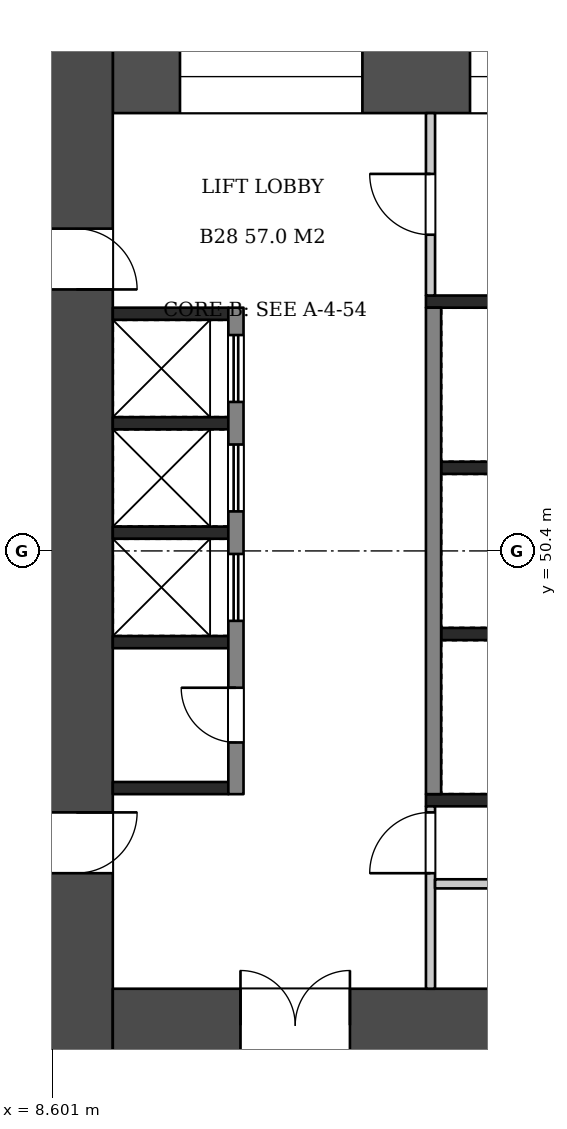
"""IFC4 building model, lengths in metres.
Left out: names, types, materials, properties, quantities, classifications, styles, units other than length and angle.
Written with IfcOpenShell. Run it as: python <this file> out.ifc"""

import sys

from ifc_helpers import new_model, si_unit, direction, frame, frame_2d, origin, place, context, subcontext, project, spatial, rectangle, extrude, element, fill, save


model = new_model("IFC4")
c1 = context("Model", 3, precision=1e-05, world=origin(), true_north=direction((0.0, 1.0)))
c2 = subcontext(c1, "Body", "Model", "MODEL_VIEW")
j1 = project(units=[si_unit("LENGTHUNIT", "METRE"), si_unit("PLANEANGLEUNIT", "RADIAN")], contexts=[c1])
p1 = place(None, origin())
s1 = spatial("IfcSite", under=j1, at=p1, CompositionType="ELEMENT")
p2 = place(p1, origin())
s2 = spatial("IfcBuilding", under=s1, at=p2, CompositionType="ELEMENT")
p3 = place(p2, frame((0.0, 0.0, 112.7)))
s3 = spatial("IfcBuildingStorey", under=s2, at=p3, CompositionType="ELEMENT", Elevation=112.7)
p4 = place(p3, frame((9.0, 58.8, 0.0), z_axis=(0.0, 0.0, 1.0), x_axis=(0.0, -1.0, 0.0)))
e1 = element("IfcWall", 1, at=p4, inside=s3, PredefinedType="SHEAR", context=c2, shape_type="SweptSolid", body=[
    extrude(rectangle(XDim=16.8, YDim=1.2, at=frame_2d((8.4, 0.0))), origin(), (0.0, 0.0, 1.0), 3.22),
])
p5 = place(p4, frame((3.1, 0.0, 0.0)))
e2 = element("IfcOpeningElement", 2, at=p5, cuts=e1, PredefinedType="OPENING", context=c2, shape_type="SweptSolid", body=[
    extrude(rectangle(XDim=1.0, YDim=2.1, at=frame_2d((0.5, 1.05))), frame((0.0, 0.61, 0.0), z_axis=(0.0, -1.0, 0.0), x_axis=(1.0, 0.0, 0.0)), (0.0, 0.0, 1.0), 1.22),
])
p6 = place(p4, frame((12.7, 0.0, 0.0)))
e3 = element("IfcOpeningElement", 3, at=p6, cuts=e1, PredefinedType="OPENING", context=c2, shape_type="SweptSolid", body=[
    extrude(rectangle(XDim=1.0, YDim=2.1, at=frame_2d((0.5, 1.05))), frame((0.0, 0.61, 0.0), z_axis=(0.0, -1.0, 0.0), x_axis=(1.0, 0.0, 0.0)), (0.0, 0.0, 1.0), 1.22),
])
p7 = place(p3, frame((9.6, 58.2, 0.0), z_axis=(0.0, 0.0, 1.0), x_axis=(1.0, 0.0, 0.0)))
e4 = element("IfcWall", 4, at=p7, inside=s3, PredefinedType="SHEAR", context=c2, shape_type="SweptSolid", body=[
    extrude(rectangle(XDim=14.4, YDim=1.2, at=frame_2d((7.2, 0.0))), origin(), (0.0, 0.0, 1.0), 3.22),
])
p8 = place(p7, frame((1.105, 0.0, 0.6)))
e5 = element("IfcOpeningElement", 5, at=p8, cuts=e4, PredefinedType="OPENING", context=c2, shape_type="SweptSolid", body=[
    extrude(rectangle(XDim=3.0, YDim=2.1, at=frame_2d((1.5, 1.05))), frame((0.0, 0.61, 0.0), z_axis=(0.0, -1.0, 0.0), x_axis=(1.0, 0.0, 0.0)), (0.0, 0.0, 1.0), 1.22),
])
p9 = place(p7, frame((5.875, 0.0, 0.6)))
e6 = element("IfcOpeningElement", 6, at=p9, cuts=e4, PredefinedType="OPENING", context=c2, shape_type="SweptSolid", body=[
    extrude(rectangle(XDim=2.4, YDim=2.1, at=frame_2d((1.2, 1.05))), frame((0.0, 0.61, 0.0), z_axis=(0.0, -1.0, 0.0), x_axis=(1.0, 0.0, 0.0)), (0.0, 0.0, 1.0), 1.22),
])
p10 = place(p7, frame((9.993, 0.0, 0.5)))
e7 = element("IfcOpeningElement", 7, at=p10, cuts=e4, PredefinedType="OPENING", context=c2, shape_type="SweptSolid", body=[
    extrude(rectangle(XDim=1.2, YDim=2.4, at=frame_2d((0.6, 1.2))), frame((0.0, 0.61, 0.0), z_axis=(0.0, -1.0, 0.0), x_axis=(1.0, 0.0, 0.0)), (0.0, 0.0, 1.0), 1.22),
])
p11 = place(p7, frame((12.197, 0.0, 0.5)))
e8 = element("IfcOpeningElement", 8, at=p11, cuts=e4, PredefinedType="OPENING", context=c2, shape_type="SweptSolid", body=[
    extrude(rectangle(XDim=1.2, YDim=2.4, at=frame_2d((0.6, 1.2))), frame((0.0, 0.61, 0.0), z_axis=(0.0, -1.0, 0.0), x_axis=(1.0, 0.0, 0.0)), (0.0, 0.0, 1.0), 1.22),
])
p12 = place(p3, frame((9.6, 42.6, 0.0), z_axis=(0.0, 0.0, 1.0), x_axis=(1.0, 0.0, 0.0)))
e9 = element("IfcWall", 9, at=p12, inside=s3, PredefinedType="SHEAR", context=c2, shape_type="SweptSolid", body=[
    extrude(rectangle(XDim=14.4, YDim=1.2, at=frame_2d((7.2, 0.0))), origin(), (0.0, 0.0, 1.0), 3.22),
])
p13 = place(p12, frame((2.1, 0.0, 0.0)))
e10 = element("IfcOpeningElement", 10, at=p13, cuts=e9, PredefinedType="OPENING", context=c2, shape_type="SweptSolid", body=[
    extrude(rectangle(XDim=1.8, YDim=2.1, at=frame_2d((0.9, 1.05))), frame((0.0, 0.61, 0.0), z_axis=(0.0, -1.0, 0.0), x_axis=(1.0, 0.0, 0.0)), (0.0, 0.0, 1.0), 1.22),
])
for number, where, z_axis, x_axis in (
    (11, (9.6, 54.3, 0.0), (0.0, 0.0, 1.0), (1.0, 0.0, 0.0)),
    (12, (9.6, 52.5, 0.0), (0.0, 0.0, 1.0), (1.0, 0.0, 0.0)),
    (13, (9.6, 50.7, 0.0), (0.0, 0.0, 1.0), (1.0, 0.0, 0.0)),
    (14, (9.6, 48.9, 0.0), (0.0, 0.0, 1.0), (1.0, 0.0, 0.0)),
    (15, (9.6, 46.5, 0.0), (0.0, 0.0, 1.0), (1.0, 0.0, 0.0)),
):
    element("IfcWall", number, at=place(p3, frame(where, z_axis=z_axis, x_axis=x_axis)), inside=s3, PredefinedType="SHEAR", context=c2, shape_type="SweptSolid", body=[
        extrude(rectangle(XDim=1.9, YDim=0.2, at=frame_2d((0.95, 0.0))), origin(), (0.0, 0.0, 1.0), 3.22),
    ])
p14 = place(p3, frame((11.625, 54.4, 0.0), z_axis=(0.0, 0.0, 1.0), x_axis=(0.0, -1.0, 0.0)))
e16 = element("IfcWall", 16, at=p14, inside=s3, PredefinedType="SHEAR", context=c2, shape_type="SweptSolid", body=[
    extrude(rectangle(XDim=8.0, YDim=0.25, at=frame_2d((4.0, 0.0))), origin(), (0.0, 0.0, 1.0), 3.22),
])
p15 = place(p14, frame((0.45, 0.0, 0.0)))
e17 = element("IfcOpeningElement", 17, at=p15, cuts=e16, PredefinedType="OPENING", context=c2, shape_type="SweptSolid", body=[
    extrude(rectangle(XDim=1.1, YDim=2.1, at=frame_2d((0.55, 1.05))), frame((0.0, 0.135, 0.0), z_axis=(0.0, -1.0, 0.0), x_axis=(1.0, 0.0, 0.0)), (0.0, 0.0, 1.0), 0.27),
])
p16 = place(p14, frame((2.25, 0.0, 0.0)))
e18 = element("IfcOpeningElement", 18, at=p16, cuts=e16, PredefinedType="OPENING", context=c2, shape_type="SweptSolid", body=[
    extrude(rectangle(XDim=1.1, YDim=2.1, at=frame_2d((0.55, 1.05))), frame((0.0, 0.135, 0.0), z_axis=(0.0, -1.0, 0.0), x_axis=(1.0, 0.0, 0.0)), (0.0, 0.0, 1.0), 0.27),
])
p17 = place(p14, frame((4.05, 0.0, 0.0)))
e19 = element("IfcOpeningElement", 19, at=p17, cuts=e16, PredefinedType="OPENING", context=c2, shape_type="SweptSolid", body=[
    extrude(rectangle(XDim=1.1, YDim=2.1, at=frame_2d((0.55, 1.05))), frame((0.0, 0.135, 0.0), z_axis=(0.0, -1.0, 0.0), x_axis=(1.0, 0.0, 0.0)), (0.0, 0.0, 1.0), 0.27),
])
p18 = place(p14, frame((6.25, 0.0, 0.0)))
e20 = element("IfcOpeningElement", 20, at=p18, cuts=e16, PredefinedType="OPENING", context=c2, shape_type="SweptSolid", body=[
    extrude(rectangle(XDim=0.9, YDim=2.1, at=frame_2d((0.45, 1.05))), frame((0.0, 0.135, 0.0), z_axis=(0.0, -1.0, 0.0), x_axis=(1.0, 0.0, 0.0)), (0.0, 0.0, 1.0), 0.27),
])
for number, where, z_axis, x_axis in (
    (21, (15.0, 51.767, 0.0), (0.0, 0.0, 1.0), (1.0, 0.0, 0.0)),
    (22, (15.0, 49.033, 0.0), (0.0, 0.0, 1.0), (1.0, 0.0, 0.0)),
):
    element("IfcWall", number, at=place(p3, frame(where, z_axis=z_axis, x_axis=x_axis)), inside=s3, PredefinedType="SHEAR", context=c2, shape_type="SweptSolid", body=[
        extrude(rectangle(XDim=1.9, YDim=0.2, at=frame_2d((0.95, 0.0))), origin(), (0.0, 0.0, 1.0), 3.22),
    ])
p19 = place(p3, frame((14.875, 54.4, 0.0), z_axis=(0.0, 0.0, 1.0), x_axis=(0.0, -1.0, 0.0)))
e23 = element("IfcWall", 23, at=p19, inside=s3, PredefinedType="SHEAR", context=c2, shape_type="SweptSolid", body=[
    extrude(rectangle(XDim=8.0, YDim=0.25, at=frame_2d((4.0, 0.0))), origin(), (0.0, 0.0, 1.0), 3.22),
])
p20 = place(p3, frame((14.75, 54.5, 0.0), z_axis=(0.0, 0.0, 1.0), x_axis=(1.0, 0.0, 0.0)))
e24 = element("IfcWall", 24, at=p20, inside=s3, PredefinedType="SHEAR", context=c2, shape_type="SweptSolid", body=[
    extrude(rectangle(XDim=2.4, YDim=0.2, at=frame_2d((1.2, 0.0))), origin(), (0.0, 0.0, 1.0), 3.22),
])
p21 = place(p3, frame((14.825, 57.6, 0.0), z_axis=(0.0, 0.0, 1.0), x_axis=(0.0, -1.0, 0.0)))
e25 = element("IfcWall", 25, at=p21, inside=s3, PredefinedType="PARTITIONING", context=c2, shape_type="SweptSolid", body=[
    extrude(rectangle(XDim=3.0, YDim=0.15, at=frame_2d((1.5, 0.0))), origin(), (0.0, 0.0, 1.0), 3.22),
])
p22 = place(p21, frame((1.0, 0.0, 0.0)))
e26 = element("IfcOpeningElement", 26, at=p22, cuts=e25, PredefinedType="OPENING", context=c2, shape_type="SweptSolid", body=[
    extrude(rectangle(XDim=1.0, YDim=2.1, at=frame_2d((0.5, 1.05))), frame((0.0, 0.085, 0.0), z_axis=(0.0, -1.0, 0.0), x_axis=(1.0, 0.0, 0.0)), (0.0, 0.0, 1.0), 0.17),
])
p23 = place(p3, frame((14.75, 46.3, 0.0), z_axis=(0.0, 0.0, 1.0), x_axis=(1.0, 0.0, 0.0)))
e27 = element("IfcWall", 27, at=p23, inside=s3, PredefinedType="SHEAR", context=c2, shape_type="SweptSolid", body=[
    extrude(rectangle(XDim=9.25, YDim=0.2, at=frame_2d((4.625, 0.0))), origin(), (0.0, 0.0, 1.0), 3.22),
])
p24 = place(p3, frame((14.825, 46.2, 0.0), z_axis=(0.0, 0.0, 1.0), x_axis=(0.0, -1.0, 0.0)))
e28 = element("IfcWall", 28, at=p24, inside=s3, PredefinedType="PARTITIONING", context=c2, shape_type="SweptSolid", body=[
    extrude(rectangle(XDim=3.0, YDim=0.15, at=frame_2d((1.5, 0.0))), origin(), (0.0, 0.0, 1.0), 3.22),
])
p25 = place(p24, frame((0.1, 0.0, 0.0)))
e29 = element("IfcOpeningElement", 29, at=p25, cuts=e28, PredefinedType="OPENING", context=c2, shape_type="SweptSolid", body=[
    extrude(rectangle(XDim=1.0, YDim=2.1, at=frame_2d((0.5, 1.05))), frame((0.0, 0.085, 0.0), z_axis=(0.0, -1.0, 0.0), x_axis=(1.0, 0.0, 0.0)), (0.0, 0.0, 1.0), 0.17),
])
p26 = place(p3, frame((14.9, 44.925, 0.0), z_axis=(0.0, 0.0, 1.0), x_axis=(1.0, 0.0, 0.0)))
e30 = element("IfcWall", 30, at=p26, inside=s3, PredefinedType="PARTITIONING", context=c2, shape_type="SweptSolid", body=[
    extrude(rectangle(XDim=9.1, YDim=0.15, at=frame_2d((4.55, 0.0))), origin(), (0.0, 0.0, 1.0), 3.22),
])
p27 = place(p26, frame((1.738, 0.0, 0.0)))
e31 = element("IfcOpeningElement", 31, at=p27, cuts=e30, PredefinedType="OPENING", context=c2, shape_type="SweptSolid", body=[
    extrude(rectangle(XDim=1.0, YDim=2.1, at=frame_2d((0.5, 1.05))), frame((0.0, 0.085, 0.0), z_axis=(0.0, -1.0, 0.0), x_axis=(1.0, 0.0, 0.0)), (0.0, 0.0, 1.0), 0.17),
])
p28 = place(p26, frame((6.413, 0.0, 0.0)))
e32 = element("IfcOpeningElement", 32, at=p28, cuts=e30, PredefinedType="OPENING", context=c2, shape_type="SweptSolid", body=[
    extrude(rectangle(XDim=0.9, YDim=2.1, at=frame_2d((0.45, 1.05))), frame((0.0, 0.085, 0.0), z_axis=(0.0, -1.0, 0.0), x_axis=(1.0, 0.0, 0.0)), (0.0, 0.0, 1.0), 0.17),
])
p29 = place(p5, origin())
e33 = element("IfcDoor", 33, at=p29, inside=s3, OperationType="SINGLE_SWING_RIGHT", PredefinedType="DOOR", context=c2, shape_type="SweptSolid", body=[
    extrude(rectangle(XDim=1.0, YDim=2.1, at=frame_2d((0.5, 1.05))), frame((0.0, 0.025, 0.0), z_axis=(0.0, -1.0, 0.0), x_axis=(1.0, 0.0, 0.0)), (0.0, 0.0, 1.0), 0.05),
])
fill(e2, e33)
p30 = place(p6, origin())
e34 = element("IfcDoor", 34, at=p30, inside=s3, OperationType="SINGLE_SWING_LEFT", PredefinedType="DOOR", context=c2, shape_type="SweptSolid", body=[
    extrude(rectangle(XDim=1.0, YDim=2.1, at=frame_2d((0.5, 1.05))), frame((0.0, 0.025, 0.0), z_axis=(0.0, -1.0, 0.0), x_axis=(1.0, 0.0, 0.0)), (0.0, 0.0, 1.0), 0.05),
])
fill(e3, e34)
p31 = place(p13, origin())
e35 = element("IfcDoor", 35, at=p31, inside=s3, OperationType="DOUBLE_DOOR_SINGLE_SWING", PredefinedType="DOOR", context=c2, shape_type="SweptSolid", body=[
    extrude(rectangle(XDim=1.8, YDim=2.1, at=frame_2d((0.9, 1.05))), frame((0.0, 0.025, 0.0), z_axis=(0.0, -1.0, 0.0), x_axis=(1.0, 0.0, 0.0)), (0.0, 0.0, 1.0), 0.05),
])
fill(e10, e35)
p32 = place(p15, origin())
e36 = element("IfcDoor", 36, at=p32, inside=s3, OperationType="DOUBLE_DOOR_SLIDING", PredefinedType="DOOR", context=c2, shape_type="SweptSolid", body=[
    extrude(rectangle(XDim=1.1, YDim=2.1, at=frame_2d((0.55, 1.05))), frame((0.0, 0.025, 0.0), z_axis=(0.0, -1.0, 0.0), x_axis=(1.0, 0.0, 0.0)), (0.0, 0.0, 1.0), 0.05),
])
fill(e17, e36)
p33 = place(p16, origin())
e37 = element("IfcDoor", 37, at=p33, inside=s3, OperationType="DOUBLE_DOOR_SLIDING", PredefinedType="DOOR", context=c2, shape_type="SweptSolid", body=[
    extrude(rectangle(XDim=1.1, YDim=2.1, at=frame_2d((0.55, 1.05))), frame((0.0, 0.025, 0.0), z_axis=(0.0, -1.0, 0.0), x_axis=(1.0, 0.0, 0.0)), (0.0, 0.0, 1.0), 0.05),
])
fill(e18, e37)
p34 = place(p17, origin())
e38 = element("IfcDoor", 38, at=p34, inside=s3, OperationType="DOUBLE_DOOR_SLIDING", PredefinedType="DOOR", context=c2, shape_type="SweptSolid", body=[
    extrude(rectangle(XDim=1.1, YDim=2.1, at=frame_2d((0.55, 1.05))), frame((0.0, 0.025, 0.0), z_axis=(0.0, -1.0, 0.0), x_axis=(1.0, 0.0, 0.0)), (0.0, 0.0, 1.0), 0.05),
])
fill(e19, e38)
p35 = place(p18, frame((0.9, 0.0, 0.0), z_axis=(0.0, 0.0, 1.0), x_axis=(-1.0, 0.0, 0.0)))
e39 = element("IfcDoor", 39, at=p35, inside=s3, OperationType="SINGLE_SWING_RIGHT", PredefinedType="DOOR", context=c2, shape_type="SweptSolid", body=[
    extrude(rectangle(XDim=0.9, YDim=2.1, at=frame_2d((0.45, 1.05))), frame((0.0, 0.025, 0.0), z_axis=(0.0, -1.0, 0.0), x_axis=(1.0, 0.0, 0.0)), (0.0, 0.0, 1.0), 0.05),
])
fill(e20, e39)
p36 = place(p22, frame((1.0, 0.0, 0.0), z_axis=(0.0, 0.0, 1.0), x_axis=(-1.0, 0.0, 0.0)))
e40 = element("IfcDoor", 40, at=p36, inside=s3, OperationType="SINGLE_SWING_RIGHT", PredefinedType="DOOR", context=c2, shape_type="SweptSolid", body=[
    extrude(rectangle(XDim=1.0, YDim=2.1, at=frame_2d((0.5, 1.05))), frame((0.0, 0.025, 0.0), z_axis=(0.0, -1.0, 0.0), x_axis=(1.0, 0.0, 0.0)), (0.0, 0.0, 1.0), 0.05),
])
fill(e26, e40)
p37 = place(p25, frame((1.0, 0.0, 0.0), z_axis=(0.0, 0.0, 1.0), x_axis=(-1.0, 0.0, 0.0)))
e41 = element("IfcDoor", 41, at=p37, inside=s3, OperationType="SINGLE_SWING_LEFT", PredefinedType="DOOR", context=c2, shape_type="SweptSolid", body=[
    extrude(rectangle(XDim=1.0, YDim=2.1, at=frame_2d((0.5, 1.05))), frame((0.0, 0.025, 0.0), z_axis=(0.0, -1.0, 0.0), x_axis=(1.0, 0.0, 0.0)), (0.0, 0.0, 1.0), 0.05),
])
fill(e29, e41)
p38 = place(p8, origin())
e42 = element("IfcWindow", 42, at=p38, inside=s3, PartitioningType="SINGLE_PANEL", PredefinedType="WINDOW", context=c2, shape_type="SweptSolid", body=[
    extrude(rectangle(XDim=3.0, YDim=2.1, at=frame_2d((1.5, 1.05))), frame((0.0, 0.03, 0.0), z_axis=(0.0, -1.0, 0.0), x_axis=(1.0, 0.0, 0.0)), (0.0, 0.0, 1.0), 0.06),
])
fill(e5, e42)
p39 = place(p9, origin())
e43 = element("IfcWindow", 43, at=p39, inside=s3, PartitioningType="SINGLE_PANEL", PredefinedType="WINDOW", context=c2, shape_type="SweptSolid", body=[
    extrude(rectangle(XDim=2.4, YDim=2.1, at=frame_2d((1.2, 1.05))), frame((0.0, 0.03, 0.0), z_axis=(0.0, -1.0, 0.0), x_axis=(1.0, 0.0, 0.0)), (0.0, 0.0, 1.0), 0.06),
])
fill(e6, e43)
save(model, sys.argv[1])
